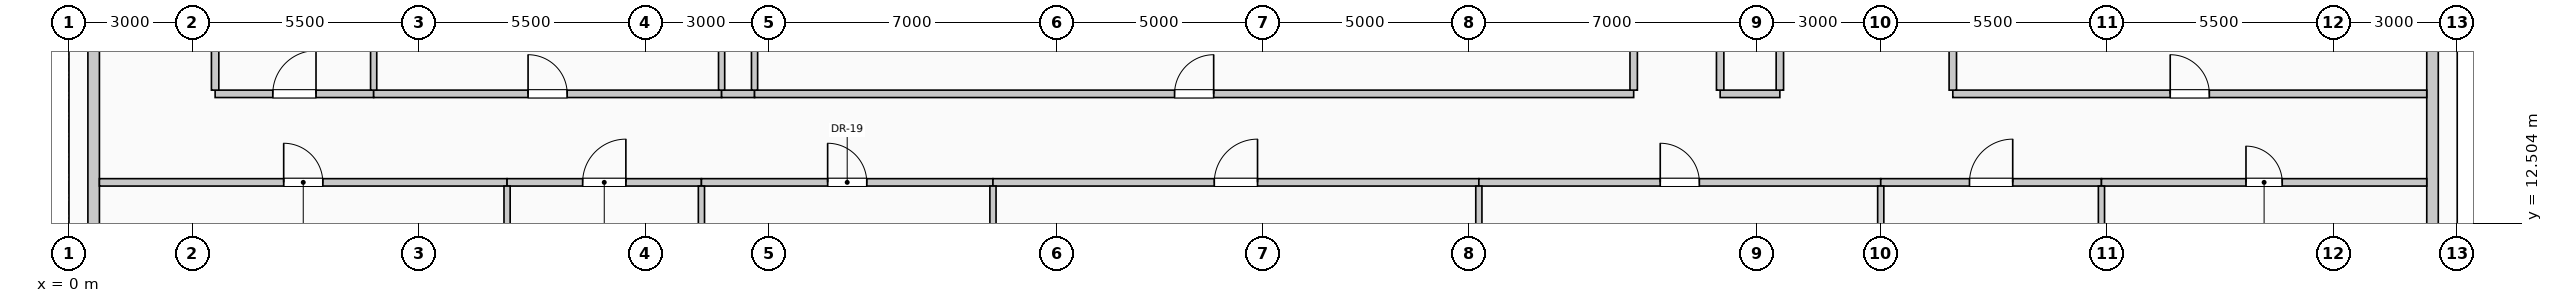
"""IFC4 building model, lengths in metres.
Left out: names, types, materials, properties, quantities, classifications, styles, units other than length and angle.
Written with IfcOpenShell. Run it as: python <this file> out.ifc"""

import sys

from ifc_helpers import new_model, si_unit, direction, frame, frame_2d, origin, place, context, subcontext, project, spatial, rectangle, extrude, element, fill, save


model = new_model("IFC4")
c1 = context("Model", 3, precision=1e-05, world=origin(), true_north=direction((0.0, 1.0)))
c2 = subcontext(c1, "Body", "Model", "MODEL_VIEW")
j1 = project(units=[si_unit("LENGTHUNIT", "METRE"), si_unit("PLANEANGLEUNIT", "RADIAN")], contexts=[c1])
p1 = place(None, origin())
s1 = spatial("IfcSite", under=j1, at=p1, CompositionType="ELEMENT")
p2 = place(p1, origin())
s2 = spatial("IfcBuilding", under=s1, at=p2, CompositionType="ELEMENT")
p3 = place(p2, frame((0.0, 0.0, 120.6)))
s3 = spatial("IfcBuildingStorey", under=s2, at=p3, CompositionType="ELEMENT", Elevation=120.6)
for number, where, z_axis, x_axis in (
    (1, (0.6, 10.445, 0.0), (0.0, 0.0, 1.0), (0.0, 1.0, 0.0)),
    (2, (57.4, 17.555, 0.0), (0.0, 0.0, 1.0), (0.0, -1.0, 0.0)),
):
    element("IfcWall", number, at=place(p3, frame(where, z_axis=z_axis, x_axis=x_axis)), inside=s3, PredefinedType="SOLIDWALL", context=c2, shape_type="SweptSolid", body=[
        extrude(rectangle(XDim=7.11, YDim=0.28, at=frame_2d((3.555, 0.0))), origin(), (0.0, 0.0, 1.0), 2.875),
    ])
p4 = place(p3, frame((0.74, 13.5, 0.0), z_axis=(0.0, 0.0, 1.0), x_axis=(1.0, 0.0, 0.0)))
e3 = element("IfcWall", 3, at=p4, inside=s3, PredefinedType="PARTITIONING", context=c2, shape_type="SweptSolid", body=[
    extrude(rectangle(XDim=9.9, YDim=0.18, at=frame_2d((4.95, 0.0))), origin(), (0.0, 0.0, 1.0), 3.725),
])
p5 = place(p4, frame((4.475, 0.0, 0.0)))
e4 = element("IfcOpeningElement", 4, at=p5, cuts=e3, PredefinedType="OPENING", context=c2, shape_type="SweptSolid", body=[
    extrude(rectangle(XDim=0.95, YDim=2.15, at=frame_2d((0.475, 1.075))), frame((0.0, 0.1, 0.0), z_axis=(0.0, -1.0, 0.0), x_axis=(1.0, 0.0, 0.0)), (0.0, 0.0, 1.0), 0.2),
])
p6 = place(p3, frame((10.64, 13.5, 0.0), z_axis=(0.0, 0.0, 1.0), x_axis=(1.0, 0.0, 0.0)))
e5 = element("IfcWall", 5, at=p6, inside=s3, PredefinedType="PARTITIONING", context=c2, shape_type="SweptSolid", body=[
    extrude(rectangle(XDim=4.72, YDim=0.18, at=frame_2d((2.36, 0.0))), origin(), (0.0, 0.0, 1.0), 3.725),
])
p7 = place(p6, frame((1.835, 0.0, 0.0)))
e6 = element("IfcOpeningElement", 6, at=p7, cuts=e5, PredefinedType="OPENING", context=c2, shape_type="SweptSolid", body=[
    extrude(rectangle(XDim=1.05, YDim=2.15, at=frame_2d((0.525, 1.075))), frame((0.0, 0.1, 0.0), z_axis=(0.0, -1.0, 0.0), x_axis=(1.0, 0.0, 0.0)), (0.0, 0.0, 1.0), 0.2),
])
p8 = place(p3, frame((15.36, 13.5, 0.0), z_axis=(0.0, 0.0, 1.0), x_axis=(1.0, 0.0, 0.0)))
e7 = element("IfcWall", 7, at=p8, inside=s3, PredefinedType="PARTITIONING", context=c2, shape_type="SweptSolid", body=[
    extrude(rectangle(XDim=7.08, YDim=0.18, at=frame_2d((3.54, 0.0))), origin(), (0.0, 0.0, 1.0), 3.725),
])
p9 = place(p8, frame((3.065, 0.0, 0.0)))
e8 = element("IfcOpeningElement", 8, at=p9, cuts=e7, PredefinedType="OPENING", context=c2, shape_type="SweptSolid", body=[
    extrude(rectangle(XDim=0.95, YDim=2.15, at=frame_2d((0.475, 1.075))), frame((0.0, 0.1, 0.0), z_axis=(0.0, -1.0, 0.0), x_axis=(1.0, 0.0, 0.0)), (0.0, 0.0, 1.0), 0.2),
])
p10 = place(p3, frame((22.44, 13.5, 0.0), z_axis=(0.0, 0.0, 1.0), x_axis=(1.0, 0.0, 0.0)))
e9 = element("IfcWall", 9, at=p10, inside=s3, PredefinedType="PARTITIONING", context=c2, shape_type="SweptSolid", body=[
    extrude(rectangle(XDim=11.8, YDim=0.18, at=frame_2d((5.9, 0.0))), origin(), (0.0, 0.0, 1.0), 3.725),
])
p11 = place(p10, frame((5.375, 0.0, 0.0)))
e10 = element("IfcOpeningElement", 10, at=p11, cuts=e9, PredefinedType="OPENING", context=c2, shape_type="SweptSolid", body=[
    extrude(rectangle(XDim=1.05, YDim=2.15, at=frame_2d((0.525, 1.075))), frame((0.0, 0.1, 0.0), z_axis=(0.0, -1.0, 0.0), x_axis=(1.0, 0.0, 0.0)), (0.0, 0.0, 1.0), 0.2),
])
p12 = place(p3, frame((34.24, 13.5, 0.0), z_axis=(0.0, 0.0, 1.0), x_axis=(1.0, 0.0, 0.0)))
e11 = element("IfcWall", 11, at=p12, inside=s3, PredefinedType="PARTITIONING", context=c2, shape_type="SweptSolid", body=[
    extrude(rectangle(XDim=9.76, YDim=0.18, at=frame_2d((4.88, 0.0))), origin(), (0.0, 0.0, 1.0), 3.725),
])
p13 = place(p12, frame((4.405, 0.0, 0.0)))
e12 = element("IfcOpeningElement", 12, at=p13, cuts=e11, PredefinedType="OPENING", context=c2, shape_type="SweptSolid", body=[
    extrude(rectangle(XDim=0.95, YDim=2.15, at=frame_2d((0.475, 1.075))), frame((0.0, 0.1, 0.0), z_axis=(0.0, -1.0, 0.0), x_axis=(1.0, 0.0, 0.0)), (0.0, 0.0, 1.0), 0.2),
])
p14 = place(p3, frame((44.0, 13.5, 0.0), z_axis=(0.0, 0.0, 1.0), x_axis=(1.0, 0.0, 0.0)))
e13 = element("IfcWall", 13, at=p14, inside=s3, PredefinedType="PARTITIONING", context=c2, shape_type="SweptSolid", body=[
    extrude(rectangle(XDim=5.36, YDim=0.18, at=frame_2d((2.68, 0.0))), origin(), (0.0, 0.0, 1.0), 3.725),
])
p15 = place(p14, frame((2.155, 0.0, 0.0)))
e14 = element("IfcOpeningElement", 14, at=p15, cuts=e13, PredefinedType="OPENING", context=c2, shape_type="SweptSolid", body=[
    extrude(rectangle(XDim=1.05, YDim=2.15, at=frame_2d((0.525, 1.075))), frame((0.0, 0.1, 0.0), z_axis=(0.0, -1.0, 0.0), x_axis=(1.0, 0.0, 0.0)), (0.0, 0.0, 1.0), 0.2),
])
p16 = place(p3, frame((49.36, 13.5, 0.0), z_axis=(0.0, 0.0, 1.0), x_axis=(1.0, 0.0, 0.0)))
e15 = element("IfcWall", 15, at=p16, inside=s3, PredefinedType="PARTITIONING", context=c2, shape_type="SweptSolid", body=[
    extrude(rectangle(XDim=7.9, YDim=0.18, at=frame_2d((3.95, 0.0))), origin(), (0.0, 0.0, 1.0), 3.725),
])
p17 = place(p16, frame((3.51, 0.0, 0.0)))
e16 = element("IfcOpeningElement", 16, at=p17, cuts=e15, PredefinedType="OPENING", context=c2, shape_type="SweptSolid", body=[
    extrude(rectangle(XDim=0.88, YDim=2.1, at=frame_2d((0.44, 1.05))), frame((0.0, 0.1, 0.0), z_axis=(0.0, -1.0, 0.0), x_axis=(1.0, 0.0, 0.0)), (0.0, 0.0, 1.0), 0.2),
])
p18 = place(p3, frame((3.55, 15.65, 0.0), z_axis=(0.0, 0.0, 1.0), x_axis=(1.0, 0.0, 0.0)))
e17 = element("IfcWall", 17, at=p18, inside=s3, PredefinedType="PARTITIONING", context=c2, shape_type="SweptSolid", body=[
    extrude(rectangle(XDim=3.85, YDim=0.18, at=frame_2d((1.925, 0.0))), origin(), (0.0, 0.0, 1.0), 3.725),
])
p19 = place(p18, frame((1.4, 0.0, 0.0)))
e18 = element("IfcOpeningElement", 18, at=p19, cuts=e17, PredefinedType="OPENING", context=c2, shape_type="SweptSolid", body=[
    extrude(rectangle(XDim=1.05, YDim=2.15, at=frame_2d((0.525, 1.075))), frame((0.0, 0.1, 0.0), z_axis=(0.0, -1.0, 0.0), x_axis=(1.0, 0.0, 0.0)), (0.0, 0.0, 1.0), 0.2),
])
p20 = place(p3, frame((7.4, 15.65, 0.0), z_axis=(0.0, 0.0, 1.0), x_axis=(1.0, 0.0, 0.0)))
e19 = element("IfcWall", 19, at=p20, inside=s3, PredefinedType="PARTITIONING", context=c2, shape_type="SweptSolid", body=[
    extrude(rectangle(XDim=8.45, YDim=0.18, at=frame_2d((4.225, 0.0))), origin(), (0.0, 0.0, 1.0), 3.725),
])
p21 = place(p20, frame((3.75, 0.0, 0.0)))
e20 = element("IfcOpeningElement", 20, at=p21, cuts=e19, PredefinedType="OPENING", context=c2, shape_type="SweptSolid", body=[
    extrude(rectangle(XDim=0.95, YDim=2.15, at=frame_2d((0.475, 1.075))), frame((0.0, 0.1, 0.0), z_axis=(0.0, -1.0, 0.0), x_axis=(1.0, 0.0, 0.0)), (0.0, 0.0, 1.0), 0.2),
])
p22 = place(p3, frame((15.85, 15.65, 0.0), z_axis=(0.0, 0.0, 1.0), x_axis=(1.0, 0.0, 0.0)))
e21 = element("IfcWall", 21, at=p22, inside=s3, PredefinedType="PARTITIONING", context=c2, shape_type="SweptSolid", body=[
    extrude(rectangle(XDim=0.8, YDim=0.18, at=frame_2d((0.4, 0.0))), origin(), (0.0, 0.0, 1.0), 3.725),
])
p23 = place(p3, frame((16.65, 15.65, 0.0), z_axis=(0.0, 0.0, 1.0), x_axis=(1.0, 0.0, 0.0)))
e22 = element("IfcWall", 22, at=p23, inside=s3, PredefinedType="PARTITIONING", context=c2, shape_type="SweptSolid", body=[
    extrude(rectangle(XDim=21.35, YDim=0.18, at=frame_2d((10.675, 0.0))), origin(), (0.0, 0.0, 1.0), 3.725),
])
p24 = place(p23, frame((10.2, 0.0, 0.0)))
e23 = element("IfcOpeningElement", 23, at=p24, cuts=e22, PredefinedType="OPENING", context=c2, shape_type="SweptSolid", body=[
    extrude(rectangle(XDim=0.95, YDim=2.15, at=frame_2d((0.475, 1.075))), frame((0.0, 0.1, 0.0), z_axis=(0.0, -1.0, 0.0), x_axis=(1.0, 0.0, 0.0)), (0.0, 0.0, 1.0), 0.2),
])
p25 = place(p3, frame((40.1, 15.65, 0.0), z_axis=(0.0, 0.0, 1.0), x_axis=(1.0, 0.0, 0.0)))
e24 = element("IfcWall", 24, at=p25, inside=s3, PredefinedType="PARTITIONING", context=c2, shape_type="SweptSolid", body=[
    extrude(rectangle(XDim=1.45, YDim=0.18, at=frame_2d((0.725, 0.0))), origin(), (0.0, 0.0, 1.0), 3.725),
])
p26 = place(p3, frame((45.75, 15.65, 0.0), z_axis=(0.0, 0.0, 1.0), x_axis=(1.0, 0.0, 0.0)))
e25 = element("IfcWall", 25, at=p26, inside=s3, PredefinedType="PARTITIONING", context=c2, shape_type="SweptSolid", body=[
    extrude(rectangle(XDim=11.51, YDim=0.18, at=frame_2d((5.755, 0.0))), origin(), (0.0, 0.0, 1.0), 3.725),
])
p27 = place(p26, frame((5.28, 0.0, 0.0)))
e26 = element("IfcOpeningElement", 26, at=p27, cuts=e25, PredefinedType="OPENING", context=c2, shape_type="SweptSolid", body=[
    extrude(rectangle(XDim=0.95, YDim=2.15, at=frame_2d((0.475, 1.075))), frame((0.0, 0.1, 0.0), z_axis=(0.0, -1.0, 0.0), x_axis=(1.0, 0.0, 0.0)), (0.0, 0.0, 1.0), 0.2),
])
p28 = place(p3, frame((3.55, 15.74, 0.0), z_axis=(0.0, 0.0, 1.0), x_axis=(0.0, 1.0, 0.0)))
e27 = element("IfcWall", 27, at=p28, inside=s3, PredefinedType="PARTITIONING", context=c2, shape_type="SweptSolid", body=[
    extrude(rectangle(XDim=3.135, YDim=0.18, at=frame_2d((1.567, 0.0))), origin(), (0.0, 0.0, 1.0), 3.725),
])
p29 = place(p3, frame((7.4, 15.74, 0.0), z_axis=(0.0, 0.0, 1.0), x_axis=(0.0, 1.0, 0.0)))
e28 = element("IfcWall", 28, at=p29, inside=s3, PredefinedType="PARTITIONING", context=c2, shape_type="SweptSolid", body=[
    extrude(rectangle(XDim=3.135, YDim=0.15, at=frame_2d((1.567, 0.0))), origin(), (0.0, 0.0, 1.0), 3.725),
])
for number, where, z_axis, x_axis in (
    (29, (10.64, 0.74, 0.0), (0.0, 0.0, 1.0), (0.0, 1.0, 0.0)),
    (30, (15.36, 0.74, 0.0), (0.0, 0.0, 1.0), (0.0, 1.0, 0.0)),
):
    element("IfcWall", number, at=place(p3, frame(where, z_axis=z_axis, x_axis=x_axis)), inside=s3, PredefinedType="PARTITIONING", context=c2, shape_type="SweptSolid", body=[
        extrude(rectangle(XDim=12.67, YDim=0.15, at=frame_2d((6.335, 0.0))), origin(), (0.0, 0.0, 1.0), 3.725),
    ])
p30 = place(p3, frame((15.85, 15.74, 0.0), z_axis=(0.0, 0.0, 1.0), x_axis=(0.0, 1.0, 0.0)))
e31 = element("IfcWall", 31, at=p30, inside=s3, PredefinedType="PARTITIONING", context=c2, shape_type="SweptSolid", body=[
    extrude(rectangle(XDim=1.76, YDim=0.15, at=frame_2d((0.88, 0.0))), origin(), (0.0, 0.0, 1.0), 3.725),
])
p31 = place(p3, frame((16.65, 15.74, 0.0), z_axis=(0.0, 0.0, 1.0), x_axis=(0.0, 1.0, 0.0)))
e32 = element("IfcWall", 32, at=p31, inside=s3, PredefinedType="PARTITIONING", context=c2, shape_type="SweptSolid", body=[
    extrude(rectangle(XDim=1.76, YDim=0.15, at=frame_2d((0.88, 0.0))), origin(), (0.0, 0.0, 1.0), 3.07),
])
p32 = place(p3, frame((22.44, 0.74, 0.0), z_axis=(0.0, 0.0, 1.0), x_axis=(0.0, 1.0, 0.0)))
e33 = element("IfcWall", 33, at=p32, inside=s3, PredefinedType="PARTITIONING", context=c2, shape_type="SweptSolid", body=[
    extrude(rectangle(XDim=12.67, YDim=0.15, at=frame_2d((6.335, 0.0))), origin(), (0.0, 0.0, 1.0), 3.725),
])
p33 = place(p3, frame((34.24, 1.3, 0.0), z_axis=(0.0, 0.0, 1.0), x_axis=(0.0, 1.0, 0.0)))
e34 = element("IfcWall", 34, at=p33, inside=s3, PredefinedType="PARTITIONING", context=c2, shape_type="SweptSolid", body=[
    extrude(rectangle(XDim=12.11, YDim=0.15, at=frame_2d((6.055, 0.0))), origin(), (0.0, 0.0, 1.0), 3.725),
])
p34 = place(p3, frame((38.0, 15.74, 0.0), z_axis=(0.0, 0.0, 1.0), x_axis=(0.0, 1.0, 0.0)))
e35 = element("IfcWall", 35, at=p34, inside=s3, PredefinedType="PARTITIONING", context=c2, shape_type="SweptSolid", body=[
    extrude(rectangle(XDim=10.785, YDim=0.18, at=frame_2d((5.393, 0.0))), origin(), (0.0, 0.0, 1.0), 3.725),
])
p35 = place(p3, frame((40.1, 15.74, 0.0), z_axis=(0.0, 0.0, 1.0), x_axis=(0.0, 1.0, 0.0)))
e36 = element("IfcWall", 36, at=p35, inside=s3, PredefinedType="PARTITIONING", context=c2, shape_type="SweptSolid", body=[
    extrude(rectangle(XDim=12.77, YDim=0.18, at=frame_2d((6.385, 0.0))), origin(), (0.0, 0.0, 1.0), 3.725),
])
p36 = place(p3, frame((41.55, 15.74, 0.0), z_axis=(0.0, 0.0, 1.0), x_axis=(0.0, 1.0, 0.0)))
e37 = element("IfcWall", 37, at=p36, inside=s3, PredefinedType="PARTITIONING", context=c2, shape_type="SweptSolid", body=[
    extrude(rectangle(XDim=1.76, YDim=0.18, at=frame_2d((0.88, 0.0))), origin(), (0.0, 0.0, 1.0), 3.07),
])
p37 = place(p3, frame((44.0, 1.175, 0.0), z_axis=(0.0, 0.0, 1.0), x_axis=(0.0, 1.0, 0.0)))
e38 = element("IfcWall", 38, at=p37, inside=s3, PredefinedType="PARTITIONING", context=c2, shape_type="SweptSolid", body=[
    extrude(rectangle(XDim=12.235, YDim=0.15, at=frame_2d((6.117, 0.0))), origin(), (0.0, 0.0, 1.0), 3.725),
])
p38 = place(p3, frame((45.75, 15.74, 0.0), z_axis=(0.0, 0.0, 1.0), x_axis=(0.0, 1.0, 0.0)))
e39 = element("IfcWall", 39, at=p38, inside=s3, PredefinedType="PARTITIONING", context=c2, shape_type="SweptSolid", body=[
    extrude(rectangle(XDim=8.185, YDim=0.18, at=frame_2d((4.093, 0.0))), origin(), (0.0, 0.0, 1.0), 3.725),
])
p39 = place(p3, frame((49.36, 1.175, 0.0), z_axis=(0.0, 0.0, 1.0), x_axis=(0.0, 1.0, 0.0)))
e40 = element("IfcWall", 40, at=p39, inside=s3, PredefinedType="PARTITIONING", context=c2, shape_type="SweptSolid", body=[
    extrude(rectangle(XDim=12.235, YDim=0.15, at=frame_2d((6.117, 0.0))), origin(), (0.0, 0.0, 1.0), 3.725),
])
p40 = place(p5, origin())
e41 = element("IfcDoor", 41, at=p40, inside=s3, OperationType="SINGLE_SWING_LEFT", PredefinedType="DOOR", context=c2, shape_type="SweptSolid", body=[
    extrude(rectangle(XDim=0.95, YDim=2.15, at=frame_2d((0.475, 1.075))), frame((0.0, 0.025, 0.0), z_axis=(0.0, -1.0, 0.0), x_axis=(1.0, 0.0, 0.0)), (0.0, 0.0, 1.0), 0.05),
])
fill(e4, e41)
p41 = place(p7, origin())
e42 = element("IfcDoor", 42, at=p41, inside=s3, OperationType="SINGLE_SWING_RIGHT", PredefinedType="DOOR", context=c2, shape_type="SweptSolid", body=[
    extrude(rectangle(XDim=1.05, YDim=2.15, at=frame_2d((0.525, 1.075))), frame((0.0, 0.025, 0.0), z_axis=(0.0, -1.0, 0.0), x_axis=(1.0, 0.0, 0.0)), (0.0, 0.0, 1.0), 0.05),
])
fill(e6, e42)
p42 = place(p9, origin())
e43 = element("IfcDoor", 43, at=p42, inside=s3, OperationType="SINGLE_SWING_LEFT", PredefinedType="DOOR", context=c2, shape_type="SweptSolid", body=[
    extrude(rectangle(XDim=0.95, YDim=2.15, at=frame_2d((0.475, 1.075))), frame((0.0, 0.025, 0.0), z_axis=(0.0, -1.0, 0.0), x_axis=(1.0, 0.0, 0.0)), (0.0, 0.0, 1.0), 0.05),
])
fill(e8, e43)
p43 = place(p11, origin())
e44 = element("IfcDoor", 44, at=p43, inside=s3, OperationType="SINGLE_SWING_RIGHT", PredefinedType="DOOR", context=c2, shape_type="SweptSolid", body=[
    extrude(rectangle(XDim=1.05, YDim=2.15, at=frame_2d((0.525, 1.075))), frame((0.0, 0.025, 0.0), z_axis=(0.0, -1.0, 0.0), x_axis=(1.0, 0.0, 0.0)), (0.0, 0.0, 1.0), 0.05),
])
fill(e10, e44)
p44 = place(p13, origin())
e45 = element("IfcDoor", 45, at=p44, inside=s3, OperationType="SINGLE_SWING_LEFT", PredefinedType="DOOR", context=c2, shape_type="SweptSolid", body=[
    extrude(rectangle(XDim=0.95, YDim=2.15, at=frame_2d((0.475, 1.075))), frame((0.0, 0.025, 0.0), z_axis=(0.0, -1.0, 0.0), x_axis=(1.0, 0.0, 0.0)), (0.0, 0.0, 1.0), 0.05),
])
fill(e12, e45)
p45 = place(p15, origin())
e46 = element("IfcDoor", 46, at=p45, inside=s3, OperationType="SINGLE_SWING_RIGHT", PredefinedType="DOOR", context=c2, shape_type="SweptSolid", body=[
    extrude(rectangle(XDim=1.05, YDim=2.15, at=frame_2d((0.525, 1.075))), frame((0.0, 0.025, 0.0), z_axis=(0.0, -1.0, 0.0), x_axis=(1.0, 0.0, 0.0)), (0.0, 0.0, 1.0), 0.05),
])
fill(e14, e46)
p46 = place(p17, origin())
e47 = element("IfcDoor", 47, at=p46, inside=s3, OperationType="SINGLE_SWING_LEFT", PredefinedType="DOOR", context=c2, shape_type="SweptSolid", body=[
    extrude(rectangle(XDim=0.88, YDim=2.1, at=frame_2d((0.44, 1.05))), frame((0.0, 0.025, 0.0), z_axis=(0.0, -1.0, 0.0), x_axis=(1.0, 0.0, 0.0)), (0.0, 0.0, 1.0), 0.05),
])
fill(e16, e47)
p47 = place(p19, origin())
e48 = element("IfcDoor", 48, at=p47, inside=s3, OperationType="SINGLE_SWING_RIGHT", PredefinedType="DOOR", context=c2, shape_type="SweptSolid", body=[
    extrude(rectangle(XDim=1.05, YDim=2.15, at=frame_2d((0.525, 1.075))), frame((0.0, 0.025, 0.0), z_axis=(0.0, -1.0, 0.0), x_axis=(1.0, 0.0, 0.0)), (0.0, 0.0, 1.0), 0.05),
])
fill(e18, e48)
p48 = place(p21, origin())
e49 = element("IfcDoor", 49, at=p48, inside=s3, OperationType="SINGLE_SWING_LEFT", PredefinedType="DOOR", context=c2, shape_type="SweptSolid", body=[
    extrude(rectangle(XDim=0.95, YDim=2.15, at=frame_2d((0.475, 1.075))), frame((0.0, 0.025, 0.0), z_axis=(0.0, -1.0, 0.0), x_axis=(1.0, 0.0, 0.0)), (0.0, 0.0, 1.0), 0.05),
])
fill(e20, e49)
p49 = place(p24, origin())
e50 = element("IfcDoor", 50, at=p49, inside=s3, OperationType="SINGLE_SWING_RIGHT", PredefinedType="DOOR", context=c2, shape_type="SweptSolid", body=[
    extrude(rectangle(XDim=0.95, YDim=2.15, at=frame_2d((0.475, 1.075))), frame((0.0, 0.025, 0.0), z_axis=(0.0, -1.0, 0.0), x_axis=(1.0, 0.0, 0.0)), (0.0, 0.0, 1.0), 0.05),
])
fill(e23, e50)
p50 = place(p27, origin())
e51 = element("IfcDoor", 51, at=p50, inside=s3, OperationType="SINGLE_SWING_LEFT", PredefinedType="DOOR", context=c2, shape_type="SweptSolid", body=[
    extrude(rectangle(XDim=0.95, YDim=2.15, at=frame_2d((0.475, 1.075))), frame((0.0, 0.025, 0.0), z_axis=(0.0, -1.0, 0.0), x_axis=(1.0, 0.0, 0.0)), (0.0, 0.0, 1.0), 0.05),
])
fill(e26, e51)
save(model, sys.argv[1])
